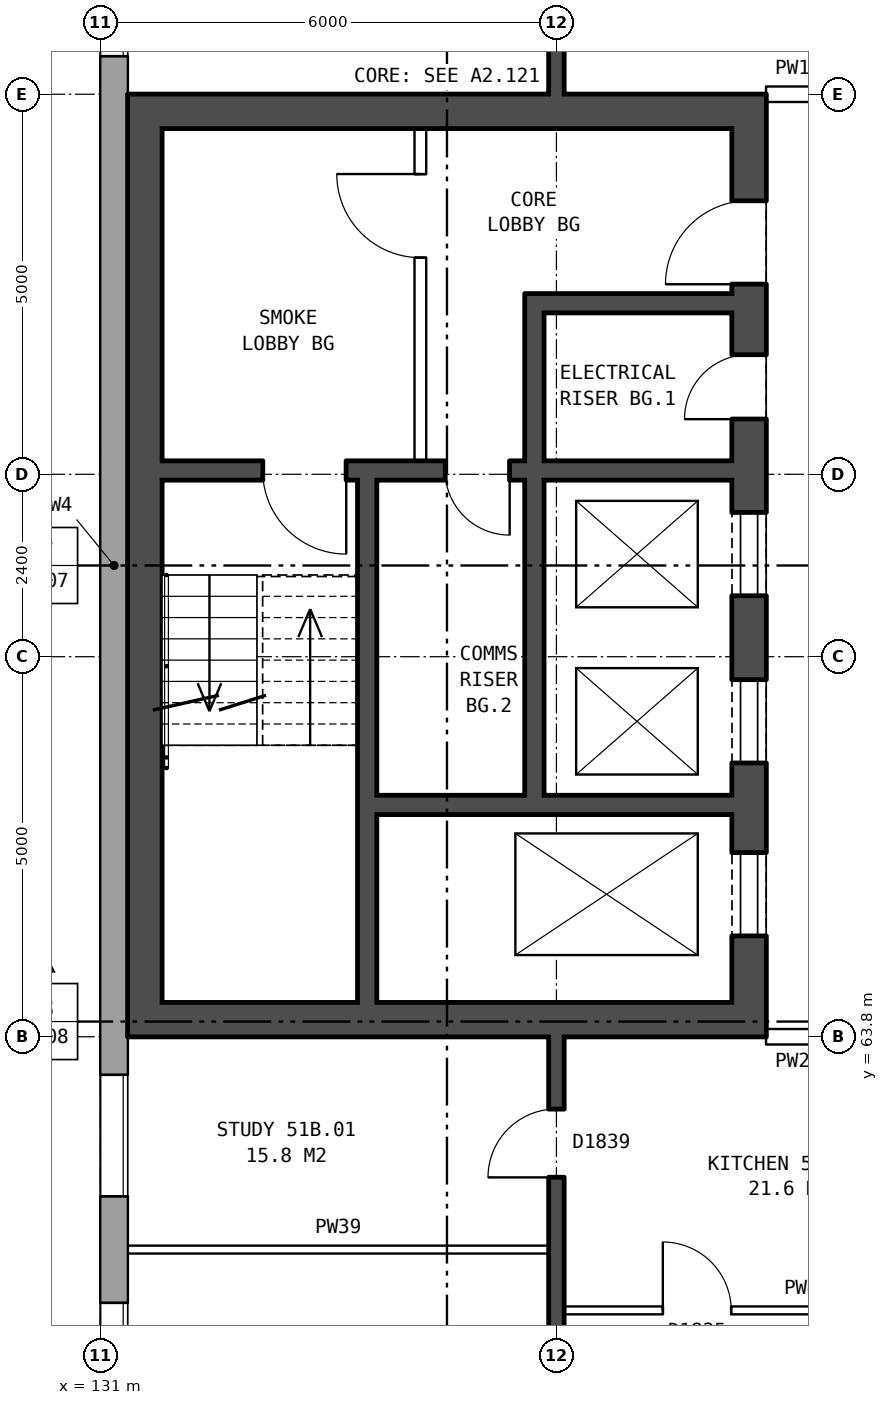
"""IFC4 building model, lengths in metres.
Left out: names, types, materials, properties, quantities, classifications, styles, units other than length and angle.
Written with IfcOpenShell. Run it as: python <this file> out.ifc"""

import sys

from ifc_helpers import new_model, si_unit, direction, frame, frame_2d, origin, place, context, subcontext, project, spatial, rectangle, extrude, element, fill, save


model = new_model("IFC4")
c1 = context("Model", 3, precision=1e-05, world=origin(), true_north=direction((0.0, 1.0)))
c2 = subcontext(c1, "Body", "Model", "MODEL_VIEW")
j1 = project(units=[si_unit("LENGTHUNIT", "METRE"), si_unit("PLANEANGLEUNIT", "RADIAN")], contexts=[c1])
p1 = place(None, origin())
s1 = spatial("IfcSite", under=j1, at=p1, CompositionType="ELEMENT")
p2 = place(p1, origin())
s2 = spatial("IfcBuilding", under=s1, at=p2, CompositionType="ELEMENT")
p3 = place(p2, frame((0.0, 0.0, 182.0)))
s3 = spatial("IfcBuildingStorey", under=s2, at=p3, CompositionType="ELEMENT", Elevation=182.0)
p4 = place(p3, frame((131.18, 82.925, 0.0), z_axis=(0.0, 0.0, 1.0), x_axis=(0.0, -1.0, 0.0)))
e1 = element("IfcWall", 1, at=p4, inside=s3, PredefinedType="STANDARD", context=c2, shape_type="SweptSolid", body=[
    extrude(rectangle(XDim=25.851, YDim=0.36, at=frame_2d((12.925, 0.0))), origin(), (0.0, 0.0, 1.0), 2.85),
])
p5 = place(p4, frame((1.625, 0.0, 0.8)))
e2 = element("IfcOpeningElement", 2, at=p5, cuts=e1, PredefinedType="OPENING", context=c2, shape_type="SweptSolid", body=[
    extrude(rectangle(XDim=1.6, YDim=1.8, at=frame_2d((0.8, 0.9))), frame((0.0, 0.19, 0.0), z_axis=(0.0, -1.0, 0.0), x_axis=(1.0, 0.0, 0.0)), (0.0, 0.0, 1.0), 0.38),
])
p6 = place(p4, frame((4.625, 0.0, 0.8)))
e3 = element("IfcOpeningElement", 3, at=p6, cuts=e1, PredefinedType="OPENING", context=c2, shape_type="SweptSolid", body=[
    extrude(rectangle(XDim=1.6, YDim=1.8, at=frame_2d((0.8, 0.9))), frame((0.0, 0.19, 0.0), z_axis=(0.0, -1.0, 0.0), x_axis=(1.0, 0.0, 0.0)), (0.0, 0.0, 1.0), 0.38),
])
p7 = place(p4, frame((19.625, 0.0, 0.8)))
e4 = element("IfcOpeningElement", 4, at=p7, cuts=e1, PredefinedType="OPENING", context=c2, shape_type="SweptSolid", body=[
    extrude(rectangle(XDim=1.6, YDim=1.8, at=frame_2d((0.8, 0.9))), frame((0.0, 0.19, 0.0), z_axis=(0.0, -1.0, 0.0), x_axis=(1.0, 0.0, 0.0)), (0.0, 0.0, 1.0), 0.38),
])
p8 = place(p4, frame((22.625, 0.0, 0.8)))
e5 = element("IfcOpeningElement", 5, at=p8, cuts=e1, PredefinedType="OPENING", context=c2, shape_type="SweptSolid", body=[
    extrude(rectangle(XDim=1.6, YDim=1.8, at=frame_2d((0.8, 0.9))), frame((0.0, 0.19, 0.0), z_axis=(0.0, -1.0, 0.0), x_axis=(1.0, 0.0, 0.0)), (0.0, 0.0, 1.0), 0.38),
])
p9 = place(p3, frame((139.535, 63.8, 0.0), z_axis=(0.0, 0.0, 1.0), x_axis=(0.0, 1.0, 0.0)))
e6 = element("IfcWall", 6, at=p9, inside=s3, PredefinedType="SHEAR", context=c2, shape_type="SweptSolid", body=[
    extrude(rectangle(XDim=12.4, YDim=0.45, at=frame_2d((6.2, 0.0))), origin(), (0.0, 0.0, 1.0), 2.85),
])
p10 = place(p9, frame((1.325, 0.0, 0.0)))
e7 = element("IfcOpeningElement", 7, at=p10, cuts=e6, PredefinedType="OPENING", context=c2, shape_type="SweptSolid", body=[
    extrude(rectangle(XDim=1.1, YDim=2.1, at=frame_2d((0.55, 1.05))), frame((0.0, 0.235, 0.0), z_axis=(0.0, -1.0, 0.0), x_axis=(1.0, 0.0, 0.0)), (0.0, 0.0, 1.0), 0.47),
])
p11 = place(p9, frame((3.6, 0.0, 0.0)))
e8 = element("IfcOpeningElement", 8, at=p11, cuts=e6, PredefinedType="OPENING", context=c2, shape_type="SweptSolid", body=[
    extrude(rectangle(XDim=1.1, YDim=2.1, at=frame_2d((0.55, 1.05))), frame((0.0, 0.235, 0.0), z_axis=(0.0, -1.0, 0.0), x_axis=(1.0, 0.0, 0.0)), (0.0, 0.0, 1.0), 0.47),
])
p12 = place(p9, frame((5.8, 0.0, 0.0)))
e9 = element("IfcOpeningElement", 9, at=p12, cuts=e6, PredefinedType="OPENING", context=c2, shape_type="SweptSolid", body=[
    extrude(rectangle(XDim=1.1, YDim=2.1, at=frame_2d((0.55, 1.05))), frame((0.0, 0.235, 0.0), z_axis=(0.0, -1.0, 0.0), x_axis=(1.0, 0.0, 0.0)), (0.0, 0.0, 1.0), 0.47),
])
p13 = place(p9, frame((9.9, 0.0, 0.0)))
e10 = element("IfcOpeningElement", 10, at=p13, cuts=e6, PredefinedType="OPENING", context=c2, shape_type="SweptSolid", body=[
    extrude(rectangle(XDim=1.1, YDim=2.1, at=frame_2d((0.55, 1.05))), frame((0.0, 0.235, 0.0), z_axis=(0.0, -1.0, 0.0), x_axis=(1.0, 0.0, 0.0)), (0.0, 0.0, 1.0), 0.47),
])
p14 = place(p9, frame((8.125, 0.0, 0.0)))
e11 = element("IfcOpeningElement", 11, at=p14, cuts=e6, PredefinedType="OPENING", context=c2, shape_type="SweptSolid", body=[
    extrude(rectangle(XDim=0.85, YDim=2.1, at=frame_2d((0.425, 1.05))), frame((0.0, 0.235, 0.0), z_axis=(0.0, -1.0, 0.0), x_axis=(1.0, 0.0, 0.0)), (0.0, 0.0, 1.0), 0.47),
])
p15 = place(p3, frame((131.585, 63.8, 0.0), z_axis=(0.0, 0.0, 1.0), x_axis=(0.0, 1.0, 0.0)))
e12 = element("IfcWall", 12, at=p15, inside=s3, PredefinedType="SHEAR", context=c2, shape_type="SweptSolid", body=[
    extrude(rectangle(XDim=12.4, YDim=0.45, at=frame_2d((6.2, 0.0))), origin(), (0.0, 0.0, 1.0), 2.85),
])
for number, where, z_axis, x_axis in (
    (13, (139.31, 64.025, 0.0), (0.0, 0.0, 1.0), (-1.0, 0.0, 0.0)),
    (14, (139.31, 75.975, 0.0), (0.0, 0.0, 1.0), (-1.0, 0.0, 0.0)),
):
    element("IfcWall", number, at=place(p3, frame(where, z_axis=z_axis, x_axis=x_axis)), inside=s3, PredefinedType="SHEAR", context=c2, shape_type="SweptSolid", body=[
        extrude(rectangle(XDim=7.5, YDim=0.45, at=frame_2d((3.75, 0.0))), origin(), (0.0, 0.0, 1.0), 2.85),
    ])
p16 = place(p3, frame((139.31, 66.85, 0.0), z_axis=(0.0, 0.0, 1.0), x_axis=(-1.0, 0.0, 0.0)))
e15 = element("IfcWall", 15, at=p16, inside=s3, PredefinedType="SHEAR", context=c2, shape_type="SweptSolid", body=[
    extrude(rectangle(XDim=4.675, YDim=0.25, at=frame_2d((2.337, 0.0))), origin(), (0.0, 0.0, 1.0), 2.85),
])
p17 = place(p3, frame((139.31, 71.25, 0.0), z_axis=(0.0, 0.0, 1.0), x_axis=(-1.0, 0.0, 0.0)))
e16 = element("IfcWall", 16, at=p17, inside=s3, PredefinedType="SHEAR", context=c2, shape_type="SweptSolid", body=[
    extrude(rectangle(XDim=7.5, YDim=0.25, at=frame_2d((3.75, 0.0))), origin(), (0.0, 0.0, 1.0), 2.85),
])
p18 = place(p17, frame((5.075, 0.0, 0.0)))
e17 = element("IfcOpeningElement", 17, at=p18, cuts=e16, PredefinedType="OPENING", context=c2, shape_type="SweptSolid", body=[
    extrude(rectangle(XDim=1.1, YDim=2.1, at=frame_2d((0.55, 1.05))), frame((0.0, 0.135, 0.0), z_axis=(0.0, -1.0, 0.0), x_axis=(1.0, 0.0, 0.0)), (0.0, 0.0, 1.0), 0.27),
])
p19 = place(p17, frame((2.925, 0.0, 0.0)))
e18 = element("IfcOpeningElement", 18, at=p19, cuts=e16, PredefinedType="OPENING", context=c2, shape_type="SweptSolid", body=[
    extrude(rectangle(XDim=0.85, YDim=2.1, at=frame_2d((0.425, 1.05))), frame((0.0, 0.135, 0.0), z_axis=(0.0, -1.0, 0.0), x_axis=(1.0, 0.0, 0.0)), (0.0, 0.0, 1.0), 0.27),
])
p20 = place(p3, frame((139.31, 73.45, 0.0), z_axis=(0.0, 0.0, 1.0), x_axis=(-1.0, 0.0, 0.0)))
e19 = element("IfcWall", 19, at=p20, inside=s3, PredefinedType="SHEAR", context=c2, shape_type="SweptSolid", body=[
    extrude(rectangle(XDim=2.475, YDim=0.25, at=frame_2d((1.238, 0.0))), origin(), (0.0, 0.0, 1.0), 2.85),
])
p21 = place(p3, frame((136.71, 66.975, 0.0), z_axis=(0.0, 0.0, 1.0), x_axis=(0.0, 1.0, 0.0)))
e20 = element("IfcWall", 20, at=p21, inside=s3, PredefinedType="SHEAR", context=c2, shape_type="SweptSolid", body=[
    extrude(rectangle(XDim=4.15, YDim=0.25, at=frame_2d((2.075, 0.0))), origin(), (0.0, 0.0, 1.0), 2.85),
])
p22 = place(p3, frame((136.71, 71.375, 0.0), z_axis=(0.0, 0.0, 1.0), x_axis=(0.0, 1.0, 0.0)))
e21 = element("IfcWall", 21, at=p22, inside=s3, PredefinedType="SHEAR", context=c2, shape_type="SweptSolid", body=[
    extrude(rectangle(XDim=2.2, YDim=0.25, at=frame_2d((1.1, 0.0))), origin(), (0.0, 0.0, 1.0), 2.85),
])
p23 = place(p3, frame((135.21, 71.375, 0.0), z_axis=(0.0, 0.0, 1.0), x_axis=(0.0, 1.0, 0.0)))
e22 = element("IfcWall", 22, at=p23, inside=s3, PredefinedType="PARTITIONING", context=c2, shape_type="SweptSolid", body=[
    extrude(rectangle(XDim=4.375, YDim=0.15, at=frame_2d((2.188, 0.0))), origin(), (0.0, 0.0, 1.0), 2.85),
])
p24 = place(p23, frame((2.675, 0.0, 0.0)))
e23 = element("IfcOpeningElement", 23, at=p24, cuts=e22, PredefinedType="OPENING", context=c2, shape_type="SweptSolid", body=[
    extrude(rectangle(XDim=1.1, YDim=2.1, at=frame_2d((0.55, 1.05))), frame((0.0, 0.085, 0.0), z_axis=(0.0, -1.0, 0.0), x_axis=(1.0, 0.0, 0.0)), (0.0, 0.0, 1.0), 0.17),
])
p25 = place(p3, frame((134.51, 64.25, 0.0), z_axis=(0.0, 0.0, 1.0), x_axis=(0.0, 1.0, 0.0)))
e24 = element("IfcWall", 24, at=p25, inside=s3, PredefinedType="SHEAR", context=c2, shape_type="SweptSolid", body=[
    extrude(rectangle(XDim=6.875, YDim=0.25, at=frame_2d((3.438, 0.0))), origin(), (0.0, 0.0, 1.0), 2.85),
])
p26 = place(p3, frame((137.1, 60.2, 0.0), z_axis=(0.0, 0.0, 1.0), x_axis=(1.0, 0.0, 0.0)))
e25 = element("IfcWall", 25, at=p26, inside=s3, PredefinedType="PARTITIONING", context=c2, shape_type="SweptSolid", body=[
    extrude(rectangle(XDim=5.8, YDim=0.1, at=frame_2d((2.9, 0.0))), origin(), (0.0, 0.0, 1.0), 2.85),
])
p27 = place(p26, frame((1.3, 0.0, 0.0)))
e26 = element("IfcOpeningElement", 26, at=p27, cuts=e25, PredefinedType="OPENING", context=c2, shape_type="SweptSolid", body=[
    extrude(rectangle(XDim=0.9, YDim=2.1, at=frame_2d((0.45, 1.05))), frame((0.0, 0.06, 0.0), z_axis=(0.0, -1.0, 0.0), x_axis=(1.0, 0.0, 0.0)), (0.0, 0.0, 1.0), 0.12),
])
p28 = place(p26, frame((4.2, 0.0, 0.0)))
e27 = element("IfcOpeningElement", 27, at=p28, cuts=e25, PredefinedType="OPENING", context=c2, shape_type="SweptSolid", body=[
    extrude(rectangle(XDim=0.9, YDim=2.1, at=frame_2d((0.45, 1.05))), frame((0.0, 0.06, 0.0), z_axis=(0.0, -1.0, 0.0), x_axis=(1.0, 0.0, 0.0)), (0.0, 0.0, 1.0), 0.12),
])
p29 = place(p3, frame((131.36, 61.0, 0.0), z_axis=(0.0, 0.0, 1.0), x_axis=(1.0, 0.0, 0.0)))
e28 = element("IfcWall", 28, at=p29, inside=s3, PredefinedType="PARTITIONING", context=c2, shape_type="SweptSolid", body=[
    extrude(rectangle(XDim=5.54, YDim=0.1, at=frame_2d((2.77, 0.0))), origin(), (0.0, 0.0, 1.0), 2.85),
])
p30 = place(p3, frame((139.76, 63.8, 0.0), z_axis=(0.0, 0.0, 1.0), x_axis=(1.0, 0.0, 0.0)))
e29 = element("IfcWall", 29, at=p30, inside=s3, PredefinedType="PARTITIONING", context=c2, shape_type="SweptSolid", body=[
    extrude(rectangle(XDim=3.0, YDim=0.2, at=frame_2d((1.5, 0.0))), origin(), (0.0, 0.0, 1.0), 2.85),
])
p31 = place(p30, frame((1.0, 0.0, 0.0)))
e30 = element("IfcOpeningElement", 30, at=p31, cuts=e29, PredefinedType="OPENING", context=c2, shape_type="SweptSolid", body=[
    extrude(rectangle(XDim=1.0, YDim=2.1, at=frame_2d((0.5, 1.05))), frame((0.0, 0.11, 0.0), z_axis=(0.0, -1.0, 0.0), x_axis=(1.0, 0.0, 0.0)), (0.0, 0.0, 1.0), 0.22),
])
p32 = place(p3, frame((139.76, 76.2, 0.0), z_axis=(0.0, 0.0, 1.0), x_axis=(1.0, 0.0, 0.0)))
e31 = element("IfcWall", 31, at=p32, inside=s3, PredefinedType="PARTITIONING", context=c2, shape_type="SweptSolid", body=[
    extrude(rectangle(XDim=3.0, YDim=0.2, at=frame_2d((1.5, 0.0))), origin(), (0.0, 0.0, 1.0), 2.85),
])
p33 = place(p32, frame((1.0, 0.0, 0.0)))
e32 = element("IfcOpeningElement", 32, at=p33, cuts=e31, PredefinedType="OPENING", context=c2, shape_type="SweptSolid", body=[
    extrude(rectangle(XDim=1.0, YDim=2.1, at=frame_2d((0.5, 1.05))), frame((0.0, 0.11, 0.0), z_axis=(0.0, -1.0, 0.0), x_axis=(1.0, 0.0, 0.0)), (0.0, 0.0, 1.0), 0.22),
])
p34 = place(p3, frame((137.0, 54.36, 0.0), z_axis=(0.0, 0.0, 1.0), x_axis=(0.0, 1.0, 0.0)))
e33 = element("IfcWall", 33, at=p34, inside=s3, PredefinedType="SOLIDWALL", context=c2, shape_type="SweptSolid", body=[
    extrude(rectangle(XDim=9.44, YDim=0.2, at=frame_2d((4.72, 0.0))), origin(), (0.0, 0.0, 1.0), 2.85),
])
p35 = place(p34, frame((2.47, 0.0, 0.0)))
e34 = element("IfcOpeningElement", 34, at=p35, cuts=e33, PredefinedType="OPENING", context=c2, shape_type="SweptSolid", body=[
    extrude(rectangle(XDim=0.9, YDim=2.1, at=frame_2d((0.45, 1.05))), frame((0.0, 0.11, 0.0), z_axis=(0.0, -1.0, 0.0), x_axis=(1.0, 0.0, 0.0)), (0.0, 0.0, 1.0), 0.22),
])
p36 = place(p34, frame((7.59, 0.0, 0.0)))
e35 = element("IfcOpeningElement", 35, at=p36, cuts=e33, PredefinedType="OPENING", context=c2, shape_type="SweptSolid", body=[
    extrude(rectangle(XDim=0.9, YDim=2.1, at=frame_2d((0.45, 1.05))), frame((0.0, 0.11, 0.0), z_axis=(0.0, -1.0, 0.0), x_axis=(1.0, 0.0, 0.0)), (0.0, 0.0, 1.0), 0.22),
])
p37 = place(p3, frame((137.0, 76.2, 0.0), z_axis=(0.0, 0.0, 1.0), x_axis=(0.0, 1.0, 0.0)))
e36 = element("IfcWall", 36, at=p37, inside=s3, PredefinedType="SOLIDWALL", context=c2, shape_type="SweptSolid", body=[
    extrude(rectangle(XDim=9.44, YDim=0.2, at=frame_2d((4.72, 0.0))), origin(), (0.0, 0.0, 1.0), 2.85),
])
p38 = place(p37, frame((1.5, 0.0, 0.0)))
e37 = element("IfcOpeningElement", 37, at=p38, cuts=e36, PredefinedType="OPENING", context=c2, shape_type="SweptSolid", body=[
    extrude(rectangle(XDim=0.9, YDim=2.1, at=frame_2d((0.45, 1.05))), frame((0.0, 0.11, 0.0), z_axis=(0.0, -1.0, 0.0), x_axis=(1.0, 0.0, 0.0)), (0.0, 0.0, 1.0), 0.22),
])
p39 = place(p6, origin())
e38 = element("IfcWindow", 38, at=p39, inside=s3, PartitioningType="SINGLE_PANEL", PredefinedType="WINDOW", context=c2, shape_type="SweptSolid", body=[
    extrude(rectangle(XDim=1.6, YDim=1.8, at=frame_2d((0.8, 0.9))), frame((0.0, 0.15, 0.0), z_axis=(0.0, -1.0, 0.0), x_axis=(1.0, 0.0, 0.0)), (0.0, 0.0, 1.0), 0.06),
])
fill(e3, e38)
p40 = place(p7, origin())
e39 = element("IfcWindow", 39, at=p40, inside=s3, PartitioningType="SINGLE_PANEL", PredefinedType="WINDOW", context=c2, shape_type="SweptSolid", body=[
    extrude(rectangle(XDim=1.6, YDim=1.8, at=frame_2d((0.8, 0.9))), frame((0.0, 0.15, 0.0), z_axis=(0.0, -1.0, 0.0), x_axis=(1.0, 0.0, 0.0)), (0.0, 0.0, 1.0), 0.06),
])
fill(e4, e39)
p41 = place(p8, origin())
e40 = element("IfcWindow", 40, at=p41, inside=s3, PartitioningType="SINGLE_PANEL", PredefinedType="WINDOW", context=c2, shape_type="SweptSolid", body=[
    extrude(rectangle(XDim=1.6, YDim=1.8, at=frame_2d((0.8, 0.9))), frame((0.0, 0.15, 0.0), z_axis=(0.0, -1.0, 0.0), x_axis=(1.0, 0.0, 0.0)), (0.0, 0.0, 1.0), 0.06),
])
fill(e5, e40)
p42 = place(p10, origin())
e41 = element("IfcDoor", 41, at=p42, inside=s3, OperationType="DOUBLE_DOOR_SLIDING", PredefinedType="DOOR", context=c2, shape_type="SweptSolid", body=[
    extrude(rectangle(XDim=1.1, YDim=2.1, at=frame_2d((0.55, 1.05))), frame((0.0, 0.21, 0.0), z_axis=(0.0, -1.0, 0.0), x_axis=(1.0, 0.0, 0.0)), (0.0, 0.0, 1.0), 0.05),
])
fill(e7, e41)
p43 = place(p11, origin())
e42 = element("IfcDoor", 42, at=p43, inside=s3, OperationType="DOUBLE_DOOR_SLIDING", PredefinedType="DOOR", context=c2, shape_type="SweptSolid", body=[
    extrude(rectangle(XDim=1.1, YDim=2.1, at=frame_2d((0.55, 1.05))), frame((0.0, 0.21, 0.0), z_axis=(0.0, -1.0, 0.0), x_axis=(1.0, 0.0, 0.0)), (0.0, 0.0, 1.0), 0.05),
])
fill(e8, e42)
p44 = place(p12, origin())
e43 = element("IfcDoor", 43, at=p44, inside=s3, OperationType="DOUBLE_DOOR_SLIDING", PredefinedType="DOOR", context=c2, shape_type="SweptSolid", body=[
    extrude(rectangle(XDim=1.1, YDim=2.1, at=frame_2d((0.55, 1.05))), frame((0.0, 0.21, 0.0), z_axis=(0.0, -1.0, 0.0), x_axis=(1.0, 0.0, 0.0)), (0.0, 0.0, 1.0), 0.05),
])
fill(e9, e43)
p45 = place(p13, origin())
e44 = element("IfcDoor", 44, at=p45, inside=s3, OperationType="SINGLE_SWING_LEFT", PredefinedType="DOOR", context=c2, shape_type="SweptSolid", body=[
    extrude(rectangle(XDim=1.1, YDim=2.1, at=frame_2d((0.55, 1.05))), frame((0.0, 0.21, 0.0), z_axis=(0.0, -1.0, 0.0), x_axis=(1.0, 0.0, 0.0)), (0.0, 0.0, 1.0), 0.05),
])
fill(e10, e44)
p46 = place(p24, origin())
e45 = element("IfcDoor", 45, at=p46, inside=s3, OperationType="SINGLE_SWING_RIGHT", PredefinedType="DOOR", context=c2, shape_type="SweptSolid", body=[
    extrude(rectangle(XDim=1.1, YDim=2.1, at=frame_2d((0.55, 1.05))), frame((0.0, 0.025, 0.0), z_axis=(0.0, -1.0, 0.0), x_axis=(1.0, 0.0, 0.0)), (0.0, 0.0, 1.0), 0.05),
])
fill(e23, e45)
p47 = place(p18, origin())
e46 = element("IfcDoor", 46, at=p47, inside=s3, OperationType="SINGLE_SWING_LEFT", PredefinedType="DOOR", context=c2, shape_type="SweptSolid", body=[
    extrude(rectangle(XDim=1.1, YDim=2.1, at=frame_2d((0.55, 1.05))), frame((0.0, 0.025, 0.0), z_axis=(0.0, -1.0, 0.0), x_axis=(1.0, 0.0, 0.0)), (0.0, 0.0, 1.0), 0.05),
])
fill(e17, e46)
p48 = place(p14, origin())
e47 = element("IfcDoor", 47, at=p48, inside=s3, OperationType="SINGLE_SWING_LEFT", PredefinedType="DOOR", context=c2, shape_type="SweptSolid", body=[
    extrude(rectangle(XDim=0.85, YDim=2.1, at=frame_2d((0.425, 1.05))), frame((0.0, 0.21, 0.0), z_axis=(0.0, -1.0, 0.0), x_axis=(1.0, 0.0, 0.0)), (0.0, 0.0, 1.0), 0.05),
])
fill(e11, e47)
p49 = place(p19, origin())
e48 = element("IfcDoor", 48, at=p49, inside=s3, OperationType="SINGLE_SWING_LEFT", PredefinedType="DOOR", context=c2, shape_type="SweptSolid", body=[
    extrude(rectangle(XDim=0.85, YDim=2.1, at=frame_2d((0.425, 1.05))), frame((0.0, 0.025, 0.0), z_axis=(0.0, -1.0, 0.0), x_axis=(1.0, 0.0, 0.0)), (0.0, 0.0, 1.0), 0.05),
])
fill(e18, e48)
p50 = place(p36, origin())
e49 = element("IfcDoor", 49, at=p50, inside=s3, OperationType="SINGLE_SWING_LEFT", PredefinedType="DOOR", context=c2, shape_type="SweptSolid", body=[
    extrude(rectangle(XDim=0.9, YDim=2.1, at=frame_2d((0.45, 1.05))), frame((0.0, 0.025, 0.0), z_axis=(0.0, -1.0, 0.0), x_axis=(1.0, 0.0, 0.0)), (0.0, 0.0, 1.0), 0.05),
])
fill(e35, e49)
p51 = place(p27, origin())
e50 = element("IfcDoor", 50, at=p51, inside=s3, OperationType="SINGLE_SWING_LEFT", PredefinedType="DOOR", context=c2, shape_type="SweptSolid", body=[
    extrude(rectangle(XDim=0.9, YDim=2.1, at=frame_2d((0.45, 1.05))), frame((0.0, 0.025, 0.0), z_axis=(0.0, -1.0, 0.0), x_axis=(1.0, 0.0, 0.0)), (0.0, 0.0, 1.0), 0.05),
])
fill(e26, e50)
save(model, sys.argv[1])
